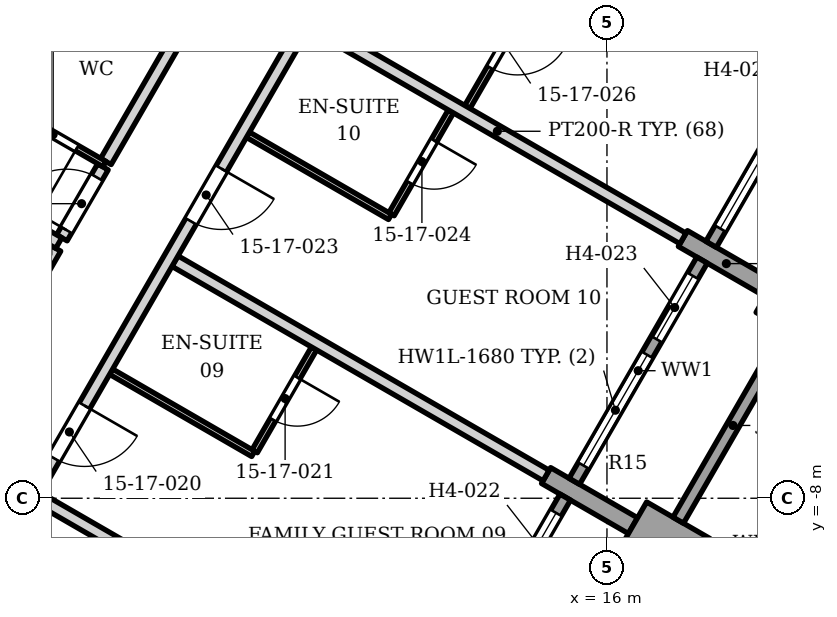
"""IFC4 building model, lengths in metres.
Left out: names, types, materials, properties, quantities, classifications, styles, units other than length and angle.
Written with IfcOpenShell. Run it as: python <this file> out.ifc"""

import sys

from ifc_helpers import new_model, si_unit, direction, frame, frame_2d, origin, origin_2d, place, context, subcontext, project, spatial, rectangle, extrude, element, fill, save


model = new_model("IFC4")
c1 = context("Model", 3, precision=1e-05, world=origin(), true_north=direction((0.0, 1.0)))
c2 = subcontext(c1, "Body", "Model", "MODEL_VIEW")
j1 = project(units=[si_unit("LENGTHUNIT", "METRE"), si_unit("PLANEANGLEUNIT", "RADIAN")], contexts=[c1])
p1 = place(None, origin())
s1 = spatial("IfcSite", under=j1, at=p1, CompositionType="ELEMENT")
p2 = place(p1, origin())
s2 = spatial("IfcBuilding", under=s1, at=p2, CompositionType="ELEMENT")
p3 = place(p2, frame((0.0, 0.0, 76.6)))
s3 = spatial("IfcBuildingStorey", under=s2, at=p3, CompositionType="ELEMENT", Elevation=76.6)
p4 = place(p3, frame((19.197, -4.854, 0.0), z_axis=(0.0, 0.0, 1.0), x_axis=(0.5, 0.866025403784, 0.0)))
e1 = element("IfcColumn", 1, at=p4, inside=s3, PredefinedType="COLUMN", context=c2, shape_type="SweptSolid", body=[
    extrude(rectangle(XDim=0.9, YDim=1.2, at=origin_2d()), origin(), (0.0, 0.0, 1.0), 3.4),
])
p5 = place(p3, frame((17.467, -9.051, 0.0), z_axis=(0.0, 0.0, 1.0), x_axis=(-0.865955154139, 0.50012165622, 0.0)))
e2 = element("IfcWall", 2, at=p5, inside=s3, PredefinedType="SOLIDWALL", context=c2, shape_type="SweptSolid", body=[
    extrude(rectangle(XDim=1.2, YDim=0.9, at=frame_2d((0.6, 0.0))), origin(), (0.0, 0.0, 1.0), 2.63),
])
p6 = place(p3, frame((16.428, -8.451, 0.0), z_axis=(0.0, 0.0, 1.0), x_axis=(-0.866040211805, 0.499974350878, 0.0)))
e3 = element("IfcWall", 3, at=p6, inside=s3, PredefinedType="SOLIDWALL", context=c2, shape_type="SweptSolid", body=[
    extrude(rectangle(XDim=1.65, YDim=0.3, at=frame_2d((0.825, 0.0))), origin(), (0.0, 0.0, 1.0), 2.384),
])
p7 = place(p3, frame((18.677, -4.554, 0.0), z_axis=(0.0, 0.0, 1.0), x_axis=(-0.865966208357, 0.500102515474, 0.0)))
e4 = element("IfcWall", 4, at=p7, inside=s3, PredefinedType="SOLIDWALL", context=c2, shape_type="SweptSolid", body=[
    extrude(rectangle(XDim=1.65, YDim=0.3, at=frame_2d((0.825, 0.0))), origin(), (0.0, 0.0, 1.0), 2.628),
])
p8 = place(p3, frame((13.214, -11.618, 0.0), z_axis=(0.0, 0.0, 1.0), x_axis=(0.500027713859, 0.866009402589, 0.0)))
e5 = element("IfcWall", 5, at=p8, inside=s3, PredefinedType="ELEMENTEDWALL", context=c2, shape_type="SweptSolid", body=[
    extrude(rectangle(XDim=4.2, YDim=0.2, at=frame_2d((2.1, 0.0))), origin(), (0.0, 0.0, 1.0), 2.242),
])
p9 = place(p8, frame((0.3, 0.0, 0.6)))
e6 = element("IfcOpeningElement", 6, at=p9, cuts=e5, PredefinedType="OPENING", context=c2, shape_type="SweptSolid", body=[
    extrude(rectangle(XDim=2.1, YDim=1.54, at=frame_2d((1.05, 0.77))), frame((0.0, 0.11, 0.0), z_axis=(0.0, -1.0, 0.0), x_axis=(1.0, 0.0, 0.0)), (0.0, 0.0, 1.0), 0.22),
])
p10 = place(p8, frame((2.7, 0.0, 0.0)))
e7 = element("IfcOpeningElement", 7, at=p10, cuts=e5, PredefinedType="OPENING", context=c2, shape_type="SweptSolid", body=[
    extrude(rectangle(XDim=1.2, YDim=2.14, at=frame_2d((0.6, 1.07))), frame((0.0, 0.11, 0.0), z_axis=(0.0, -1.0, 0.0), x_axis=(1.0, 0.0, 0.0)), (0.0, 0.0, 1.0), 0.22),
])
p11 = place(p3, frame((17.172, -8.362, 0.0), z_axis=(0.0, 0.0, 1.0), x_axis=(0.500012057535, 0.866018442252, 0.0)))
e8 = element("IfcWall", 8, at=p11, inside=s3, PredefinedType="SOLIDWALL", context=c2, shape_type="SweptSolid", body=[
    extrude(rectangle(XDim=3.6, YDim=0.2, at=frame_2d((1.8, 0.0))), origin(), (0.0, 0.0, 1.0), 2.63),
])
p12 = place(p3, frame((15.464, -7.721, 0.0), z_axis=(0.0, 0.0, 1.0), x_axis=(0.500027713859, 0.866009402589, 0.0)))
e9 = element("IfcWall", 9, at=p12, inside=s3, PredefinedType="ELEMENTEDWALL", context=c2, shape_type="SweptSolid", body=[
    extrude(rectangle(XDim=4.2, YDim=0.2, at=frame_2d((2.1, 0.0))), origin(), (0.0, 0.0, 1.0), 2.384),
])
p13 = place(p12, frame((0.3, 0.0, 0.6)))
e10 = element("IfcOpeningElement", 10, at=p13, cuts=e9, PredefinedType="OPENING", context=c2, shape_type="SweptSolid", body=[
    extrude(rectangle(XDim=2.1, YDim=1.68, at=frame_2d((1.05, 0.84))), frame((0.0, 0.11, 0.0), z_axis=(0.0, -1.0, 0.0), x_axis=(1.0, 0.0, 0.0)), (0.0, 0.0, 1.0), 0.22),
])
p14 = place(p12, frame((2.7, 0.0, 0.0)))
e11 = element("IfcOpeningElement", 11, at=p14, cuts=e9, PredefinedType="OPENING", context=c2, shape_type="SweptSolid", body=[
    extrude(rectangle(XDim=1.2, YDim=2.28, at=frame_2d((0.6, 1.14))), frame((0.0, 0.11, 0.0), z_axis=(0.0, -1.0, 0.0), x_axis=(1.0, 0.0, 0.0)), (0.0, 0.0, 1.0), 0.22),
])
p15 = place(p3, frame((17.714, -3.824, 0.0), z_axis=(0.0, 0.0, 1.0), x_axis=(0.500027713859, 0.866009402589, 0.0)))
e12 = element("IfcWall", 12, at=p15, inside=s3, PredefinedType="ELEMENTEDWALL", context=c2, shape_type="SweptSolid", body=[
    extrude(rectangle(XDim=4.2, YDim=0.2, at=frame_2d((2.1, 0.0))), origin(), (0.0, 0.0, 1.0), 2.628),
])
p16 = place(p15, frame((0.3, 0.0, 0.6)))
e13 = element("IfcOpeningElement", 13, at=p16, cuts=e12, PredefinedType="OPENING", context=c2, shape_type="SweptSolid", body=[
    extrude(rectangle(XDim=2.1, YDim=1.8, at=frame_2d((1.05, 0.9))), frame((0.0, 0.11, 0.0), z_axis=(0.0, -1.0, 0.0), x_axis=(1.0, 0.0, 0.0)), (0.0, 0.0, 1.0), 0.22),
])
p17 = place(p15, frame((2.7, 0.0, 0.0)))
e14 = element("IfcOpeningElement", 14, at=p17, cuts=e12, PredefinedType="OPENING", context=c2, shape_type="SweptSolid", body=[
    extrude(rectangle(XDim=1.2, YDim=2.4, at=frame_2d((0.6, 1.2))), frame((0.0, 0.11, 0.0), z_axis=(0.0, -1.0, 0.0), x_axis=(1.0, 0.0, 0.0)), (0.0, 0.0, 1.0), 0.22),
])
p18 = place(p3, frame((-0.029, -15.955, 0.0), z_axis=(0.0, 0.0, 1.0), x_axis=(0.499541892375, 0.866289730842, 0.0)))
e15 = element("IfcWall", 15, at=p18, inside=s3, PredefinedType="PARTITIONING", context=c2, shape_type="SweptSolid", body=[
    extrude(rectangle(XDim=13.93, YDim=0.2, at=frame_2d((6.965, 0.0))), origin(), (0.0, 0.0, 1.0), 2.242),
])
p19 = place(p18, frame((1.27, 0.0, 0.0)))
e16 = element("IfcOpeningElement", 16, at=p19, cuts=e15, PredefinedType="OPENING", context=c2, shape_type="SweptSolid", body=[
    extrude(rectangle(XDim=0.9, YDim=2.1, at=frame_2d((0.45, 1.05))), frame((0.0, 0.11, 0.0), z_axis=(0.0, -1.0, 0.0), x_axis=(1.0, 0.0, 0.0)), (0.0, 0.0, 1.0), 0.22),
])
p20 = place(p18, frame((8.235, 0.0, 0.0)))
e17 = element("IfcOpeningElement", 17, at=p20, cuts=e15, PredefinedType="OPENING", context=c2, shape_type="SweptSolid", body=[
    extrude(rectangle(XDim=0.9, YDim=2.1, at=frame_2d((0.45, 1.05))), frame((0.0, 0.11, 0.0), z_axis=(0.0, -1.0, 0.0), x_axis=(1.0, 0.0, 0.0)), (0.0, 0.0, 1.0), 0.22),
])
p21 = place(p3, frame((6.645, -7.997, 0.0), z_axis=(0.0, 0.0, 1.0), x_axis=(0.865891406831, -0.500232017744, 0.0)))
e18 = element("IfcWall", 18, at=p21, inside=s3, PredefinedType="PARTITIONING", context=c2, shape_type="SweptSolid", body=[
    extrude(rectangle(XDim=7.05, YDim=0.2, at=frame_2d((3.525, 0.0))), origin(), (0.0, 0.0, 1.0), 2.242),
])
p22 = place(p21, frame((4.85, 0.0, 0.0)))
e19 = element("IfcOpeningElement", 19, at=p22, cuts=e18, PredefinedType="OPENING", context=c2, shape_type="SweptSolid", body=[
    extrude(rectangle(XDim=0.9, YDim=2.1, at=frame_2d((0.45, 1.05))), frame((0.0, 0.11, 0.0), z_axis=(0.0, -1.0, 0.0), x_axis=(1.0, 0.0, 0.0)), (0.0, 0.0, 1.0), 0.22),
])
p23 = place(p3, frame((10.207, -7.227, 0.0), z_axis=(0.0, 0.0, 1.0), x_axis=(0.49995005938, 0.866054235095, 0.0)))
e20 = element("IfcWall", 20, at=p23, inside=s3, PredefinedType="PARTITIONING", context=c2, shape_type="SweptSolid", body=[
    extrude(rectangle(XDim=1.95, YDim=0.1, at=frame_2d((0.975, 0.0))), origin(), (0.0, 0.0, 1.0), 2.242),
])
p24 = place(p23, frame((0.6, 0.0, 0.0)))
e21 = element("IfcOpeningElement", 21, at=p24, cuts=e20, PredefinedType="OPENING", context=c2, shape_type="SweptSolid", body=[
    extrude(rectangle(XDim=0.8, YDim=2.1, at=frame_2d((0.4, 1.05))), frame((0.0, 0.06, 0.0), z_axis=(0.0, -1.0, 0.0), x_axis=(1.0, 0.0, 0.0)), (0.0, 0.0, 1.0), 0.12),
])
p25 = place(p3, frame((7.844, -5.918, 0.0), z_axis=(0.0, 0.0, 1.0), x_axis=(0.865671764241, -0.500612022024, 0.0)))
e22 = element("IfcWall", 22, at=p25, inside=s3, PredefinedType="PARTITIONING", context=c2, shape_type="SweptSolid", body=[
    extrude(rectangle(XDim=2.7, YDim=0.1, at=frame_2d((1.35, 0.0))), origin(), (0.0, 0.0, 1.0), 2.473),
])
p26 = place(p3, frame((8.895, -4.1, 0.0), z_axis=(0.0, 0.0, 1.0), x_axis=(0.865906406618, -0.500206052519, 0.0)))
e23 = element("IfcWall", 23, at=p26, inside=s3, PredefinedType="PARTITIONING", context=c2, shape_type="SweptSolid", body=[
    extrude(rectangle(XDim=7.05, YDim=0.2, at=frame_2d((3.525, 0.0))), origin(), (0.0, 0.0, 1.0), 2.242),
])
p27 = place(p3, frame((7.035, -3.717, 0.0), z_axis=(0.0, 0.0, 1.0), x_axis=(0.50106482324, 0.865409754342, 0.0)))
e24 = element("IfcWall", 24, at=p27, inside=s3, PredefinedType="PARTITIONING", context=c2, shape_type="SweptSolid", body=[
    extrude(rectangle(XDim=1.348, YDim=0.2, at=frame_2d((0.674, 0.0))), origin(), (0.0, 0.0, 1.0), 2.242),
])
p28 = place(p27, frame((0.148, 0.0, 0.0)))
e25 = element("IfcOpeningElement", 25, at=p28, cuts=e24, PredefinedType="OPENING", context=c2, shape_type="SweptSolid", body=[
    extrude(rectangle(XDim=1.0, YDim=2.1, at=frame_2d((0.5, 1.05))), frame((0.0, 0.11, 0.0), z_axis=(0.0, -1.0, 0.0), x_axis=(1.0, 0.0, 0.0)), (0.0, 0.0, 1.0), 0.22),
])
p29 = place(p3, frame((12.457, -3.33, 0.0), z_axis=(0.0, 0.0, 1.0), x_axis=(0.49989585183, 0.866085525409, 0.0)))
e26 = element("IfcWall", 26, at=p29, inside=s3, PredefinedType="PARTITIONING", context=c2, shape_type="SweptSolid", body=[
    extrude(rectangle(XDim=1.95, YDim=0.1, at=frame_2d((0.975, 0.0))), origin(), (0.0, 0.0, 1.0), 2.242),
])
p30 = place(p29, frame((0.6, 0.0, 0.0)))
e27 = element("IfcOpeningElement", 27, at=p30, cuts=e26, PredefinedType="OPENING", context=c2, shape_type="SweptSolid", body=[
    extrude(rectangle(XDim=0.8, YDim=2.1, at=frame_2d((0.4, 1.05))), frame((0.0, 0.06, 0.0), z_axis=(0.0, -1.0, 0.0), x_axis=(1.0, 0.0, 0.0)), (0.0, 0.0, 1.0), 0.12),
])
p31 = place(p3, frame((7.759, -2.462, 0.0), z_axis=(0.0, 0.0, 1.0), x_axis=(0.500533044877, 0.865717431375, 0.0)))
e28 = element("IfcWall", 28, at=p31, inside=s3, PredefinedType="PARTITIONING", context=c2, shape_type="SweptSolid", body=[
    extrude(rectangle(XDim=2.85, YDim=0.2, at=frame_2d((1.425, 0.0))), origin(), (0.0, 0.0, 1.0), 2.473),
])
p32 = place(p3, frame((10.094, -2.021, 0.0), z_axis=(0.0, 0.0, 1.0), x_axis=(0.86571095196, -0.500544251447, 0.0)))
e29 = element("IfcWall", 29, at=p32, inside=s3, PredefinedType="PARTITIONING", context=c2, shape_type="SweptSolid", body=[
    extrude(rectangle(XDim=2.7, YDim=0.1, at=frame_2d((1.35, 0.0))), origin(), (0.0, 0.0, 1.0), 2.242),
])
p33 = place(p3, frame((13.704, -1.566, 0.0), z_axis=(0.0, 0.0, 1.0), x_axis=(0.500607988505, 0.865674096785, 0.0)))
e30 = element("IfcWall", 30, at=p33, inside=s3, PredefinedType="PARTITIONING", context=c2, shape_type="SweptSolid", body=[
    extrude(rectangle(XDim=2.45, YDim=0.1, at=frame_2d((1.225, 0.0))), origin(), (0.0, 0.0, 1.0), 2.242),
])
p34 = place(p33, frame((0.75, 0.0, 0.0)))
e31 = element("IfcOpeningElement", 31, at=p34, cuts=e30, PredefinedType="OPENING", context=c2, shape_type="SweptSolid", body=[
    extrude(rectangle(XDim=0.9, YDim=2.1, at=frame_2d((0.45, 1.05))), frame((0.0, 0.06, 0.0), z_axis=(0.0, -1.0, 0.0), x_axis=(1.0, 0.0, 0.0)), (0.0, 0.0, 1.0), 0.12),
])
p35 = place(p3, frame((6.071, -1.486, 0.0), z_axis=(0.0, 0.0, 1.0), x_axis=(0.500536077286, 0.865715678115, 0.0)))
e32 = element("IfcWall", 32, at=p35, inside=s3, PredefinedType="PARTITIONING", context=c2, shape_type="SweptSolid", body=[
    extrude(rectangle(XDim=2.848, YDim=0.1, at=frame_2d((1.424, 0.0))), origin(), (0.0, 0.0, 1.0), 2.242),
])
p36 = place(p3, frame((1.919, -0.881, 0.0), z_axis=(0.0, 0.0, 1.0), x_axis=(0.866167515178, -0.499753775024, 0.0)))
e33 = element("IfcWall", 33, at=p36, inside=s3, PredefinedType="PARTITIONING", context=c2, shape_type="SweptSolid", body=[
    extrude(rectangle(XDim=5.848, YDim=0.2, at=frame_2d((2.924, 0.0))), origin(), (0.0, 0.0, 1.0), 2.242),
])
p37 = place(p3, frame((11.145, -0.202, 0.0), z_axis=(0.0, 0.0, 1.0), x_axis=(0.866031034943, -0.499990246421, 0.0)))
e34 = element("IfcWall", 34, at=p37, inside=s3, PredefinedType="PARTITIONING", context=c2, shape_type="SweptSolid", body=[
    extrude(rectangle(XDim=7.05, YDim=0.2, at=frame_2d((3.525, 0.0))), origin(), (0.0, 0.0, 1.0), 2.242),
])
p38 = place(p3, frame((2.67, 0.42, 0.0), z_axis=(0.0, 0.0, 1.0), x_axis=(0.866025730634, -0.499999433879, 0.0)))
e35 = element("IfcWall", 35, at=p38, inside=s3, PredefinedType="PARTITIONING", context=c2, shape_type="SweptSolid", body=[
    extrude(rectangle(XDim=5.85, YDim=0.1, at=frame_2d((2.925, 0.0))), origin(), (0.0, 0.0, 1.0), 2.242),
])
p39 = place(p38, frame((4.425, 0.0, 0.0)))
e36 = element("IfcOpeningElement", 36, at=p39, cuts=e35, PredefinedType="OPENING", context=c2, shape_type="SweptSolid", body=[
    extrude(rectangle(XDim=0.9, YDim=2.1, at=frame_2d((0.45, 1.05))), frame((0.0, 0.06, 0.0), z_axis=(0.0, -1.0, 0.0), x_axis=(1.0, 0.0, 0.0)), (0.0, 0.0, 1.0), 0.12),
])
p40 = place(p38, frame((2.475, 0.0, 0.0)))
e37 = element("IfcOpeningElement", 37, at=p40, cuts=e35, PredefinedType="OPENING", context=c2, shape_type="SweptSolid", body=[
    extrude(rectangle(XDim=0.9, YDim=2.1, at=frame_2d((0.45, 1.05))), frame((0.0, 0.06, 0.0), z_axis=(0.0, -1.0, 0.0), x_axis=(1.0, 0.0, 0.0)), (0.0, 0.0, 1.0), 0.12),
])
p41 = place(p38, frame((0.475, 0.0, 0.0)))
e38 = element("IfcOpeningElement", 38, at=p41, cuts=e35, PredefinedType="OPENING", context=c2, shape_type="SweptSolid", body=[
    extrude(rectangle(XDim=1.0, YDim=2.1, at=frame_2d((0.5, 1.05))), frame((0.0, 0.06, 0.0), z_axis=(0.0, -1.0, 0.0), x_axis=(1.0, 0.0, 0.0)), (0.0, 0.0, 1.0), 0.12),
])
p42 = place(p3, frame((0.859, -17.822, 0.0), z_axis=(0.0, 0.0, 1.0), x_axis=(0.500002395808, 0.866024020559, 0.0)))
e39 = element("IfcWall", 39, at=p42, inside=s3, PredefinedType="PARTITIONING", context=c2, shape_type="SweptSolid", body=[
    extrude(rectangle(XDim=23.0, YDim=0.2, at=frame_2d((11.5, 0.0))), origin(), (0.0, 0.0, 1.0), 2.242),
])
p43 = place(p42, frame((0.7, 0.0, 0.0)))
e40 = element("IfcOpeningElement", 40, at=p43, cuts=e39, PredefinedType="OPENING", context=c2, shape_type="SweptSolid", body=[
    extrude(rectangle(XDim=1.0, YDim=2.1, at=frame_2d((0.5, 1.05))), frame((0.0, 0.11, 0.0), z_axis=(0.0, -1.0, 0.0), x_axis=(1.0, 0.0, 0.0)), (0.0, 0.0, 1.0), 0.22),
])
p44 = place(p42, frame((3.1, 0.0, 0.0)))
e41 = element("IfcOpeningElement", 41, at=p44, cuts=e39, PredefinedType="OPENING", context=c2, shape_type="SweptSolid", body=[
    extrude(rectangle(XDim=1.0, YDim=2.1, at=frame_2d((0.5, 1.05))), frame((0.0, 0.11, 0.0), z_axis=(0.0, -1.0, 0.0), x_axis=(1.0, 0.0, 0.0)), (0.0, 0.0, 1.0), 0.22),
])
p45 = place(p42, frame((9.7, 0.0, 0.0)))
e42 = element("IfcOpeningElement", 42, at=p45, cuts=e39, PredefinedType="OPENING", context=c2, shape_type="SweptSolid", body=[
    extrude(rectangle(XDim=1.0, YDim=2.1, at=frame_2d((0.5, 1.05))), frame((0.0, 0.11, 0.0), z_axis=(0.0, -1.0, 0.0), x_axis=(1.0, 0.0, 0.0)), (0.0, 0.0, 1.0), 0.22),
])
p46 = place(p42, frame((12.1, 0.0, 0.0)))
e43 = element("IfcOpeningElement", 43, at=p46, cuts=e39, PredefinedType="OPENING", context=c2, shape_type="SweptSolid", body=[
    extrude(rectangle(XDim=1.0, YDim=2.1, at=frame_2d((0.5, 1.05))), frame((0.0, 0.11, 0.0), z_axis=(0.0, -1.0, 0.0), x_axis=(1.0, 0.0, 0.0)), (0.0, 0.0, 1.0), 0.22),
])
p47 = place(p42, frame((16.6, 0.0, 0.0)))
e44 = element("IfcOpeningElement", 44, at=p47, cuts=e39, PredefinedType="OPENING", context=c2, shape_type="SweptSolid", body=[
    extrude(rectangle(XDim=1.0, YDim=2.1, at=frame_2d((0.5, 1.05))), frame((0.0, 0.11, 0.0), z_axis=(0.0, -1.0, 0.0), x_axis=(1.0, 0.0, 0.0)), (0.0, 0.0, 1.0), 0.22),
])
p48 = place(p10, origin())
e45 = element("IfcDoor", 45, at=p48, inside=s3, OperationType="SINGLE_SWING_LEFT", PredefinedType="DOOR", context=c2, shape_type="SweptSolid", body=[
    extrude(rectangle(XDim=1.2, YDim=2.14, at=frame_2d((0.6, 1.07))), frame((0.0, 0.025, 0.0), z_axis=(0.0, -1.0, 0.0), x_axis=(1.0, 0.0, 0.0)), (0.0, 0.0, 1.0), 0.05),
])
fill(e7, e45)
p49 = place(p13, origin())
e46 = element("IfcWindow", 46, at=p49, inside=s3, PartitioningType="SINGLE_PANEL", PredefinedType="WINDOW", context=c2, shape_type="SweptSolid", body=[
    extrude(rectangle(XDim=2.1, YDim=1.68, at=frame_2d((1.05, 0.84))), frame((0.0, 0.03, 0.0), z_axis=(0.0, -1.0, 0.0), x_axis=(1.0, 0.0, 0.0)), (0.0, 0.0, 1.0), 0.06),
])
fill(e10, e46)
p50 = place(p14, origin())
e47 = element("IfcDoor", 47, at=p50, inside=s3, OperationType="SINGLE_SWING_LEFT", PredefinedType="DOOR", context=c2, shape_type="SweptSolid", body=[
    extrude(rectangle(XDim=1.2, YDim=2.28, at=frame_2d((0.6, 1.14))), frame((0.0, 0.025, 0.0), z_axis=(0.0, -1.0, 0.0), x_axis=(1.0, 0.0, 0.0)), (0.0, 0.0, 1.0), 0.05),
])
fill(e11, e47)
p51 = place(p16, origin())
e48 = element("IfcWindow", 48, at=p51, inside=s3, PartitioningType="SINGLE_PANEL", PredefinedType="WINDOW", context=c2, shape_type="SweptSolid", body=[
    extrude(rectangle(XDim=2.1, YDim=1.8, at=frame_2d((1.05, 0.9))), frame((0.0, 0.03, 0.0), z_axis=(0.0, -1.0, 0.0), x_axis=(1.0, 0.0, 0.0)), (0.0, 0.0, 1.0), 0.06),
])
fill(e13, e48)
p52 = place(p46, origin())
e49 = element("IfcDoor", 49, at=p52, inside=s3, OperationType="SINGLE_SWING_RIGHT", PredefinedType="DOOR", context=c2, shape_type="SweptSolid", body=[
    extrude(rectangle(XDim=1.0, YDim=2.1, at=frame_2d((0.5, 1.05))), frame((0.0, 0.025, 0.0), z_axis=(0.0, -1.0, 0.0), x_axis=(1.0, 0.0, 0.0)), (0.0, 0.0, 1.0), 0.05),
])
fill(e43, e49)
p53 = place(p24, origin())
e50 = element("IfcDoor", 50, at=p53, inside=s3, OperationType="SINGLE_SWING_RIGHT", PredefinedType="DOOR", context=c2, shape_type="SweptSolid", body=[
    extrude(rectangle(XDim=0.8, YDim=2.1, at=frame_2d((0.4, 1.05))), frame((0.0, 0.025, 0.0), z_axis=(0.0, -1.0, 0.0), x_axis=(1.0, 0.0, 0.0)), (0.0, 0.0, 1.0), 0.05),
])
fill(e21, e50)
p54 = place(p47, origin())
e51 = element("IfcDoor", 51, at=p54, inside=s3, OperationType="SINGLE_SWING_RIGHT", PredefinedType="DOOR", context=c2, shape_type="SweptSolid", body=[
    extrude(rectangle(XDim=1.0, YDim=2.1, at=frame_2d((0.5, 1.05))), frame((0.0, 0.025, 0.0), z_axis=(0.0, -1.0, 0.0), x_axis=(1.0, 0.0, 0.0)), (0.0, 0.0, 1.0), 0.05),
])
fill(e44, e51)
p55 = place(p30, origin())
e52 = element("IfcDoor", 52, at=p55, inside=s3, OperationType="SINGLE_SWING_RIGHT", PredefinedType="DOOR", context=c2, shape_type="SweptSolid", body=[
    extrude(rectangle(XDim=0.8, YDim=2.1, at=frame_2d((0.4, 1.05))), frame((0.0, 0.025, 0.0), z_axis=(0.0, -1.0, 0.0), x_axis=(1.0, 0.0, 0.0)), (0.0, 0.0, 1.0), 0.05),
])
fill(e27, e52)
p56 = place(p34, origin())
e53 = element("IfcDoor", 53, at=p56, inside=s3, OperationType="SINGLE_SWING_RIGHT", PredefinedType="DOOR", context=c2, shape_type="SweptSolid", body=[
    extrude(rectangle(XDim=0.9, YDim=2.1, at=frame_2d((0.45, 1.05))), frame((0.0, 0.025, 0.0), z_axis=(0.0, -1.0, 0.0), x_axis=(1.0, 0.0, 0.0)), (0.0, 0.0, 1.0), 0.05),
])
fill(e31, e53)
p57 = place(p28, origin())
e54 = element("IfcDoor", 54, at=p57, inside=s3, OperationType="SINGLE_SWING_LEFT", PredefinedType="DOOR", context=c2, shape_type="SweptSolid", body=[
    extrude(rectangle(XDim=1.0, YDim=2.1, at=frame_2d((0.5, 1.05))), frame((0.0, 0.025, 0.0), z_axis=(0.0, -1.0, 0.0), x_axis=(1.0, 0.0, 0.0)), (0.0, 0.0, 1.0), 0.05),
])
fill(e25, e54)
p58 = place(p39, origin())
e55 = element("IfcDoor", 55, at=p58, inside=s3, OperationType="SINGLE_SWING_RIGHT", PredefinedType="DOOR", context=c2, shape_type="SweptSolid", body=[
    extrude(rectangle(XDim=0.9, YDim=2.1, at=frame_2d((0.45, 1.05))), frame((0.0, 0.025, 0.0), z_axis=(0.0, -1.0, 0.0), x_axis=(1.0, 0.0, 0.0)), (0.0, 0.0, 1.0), 0.05),
])
fill(e36, e55)
save(model, sys.argv[1])
